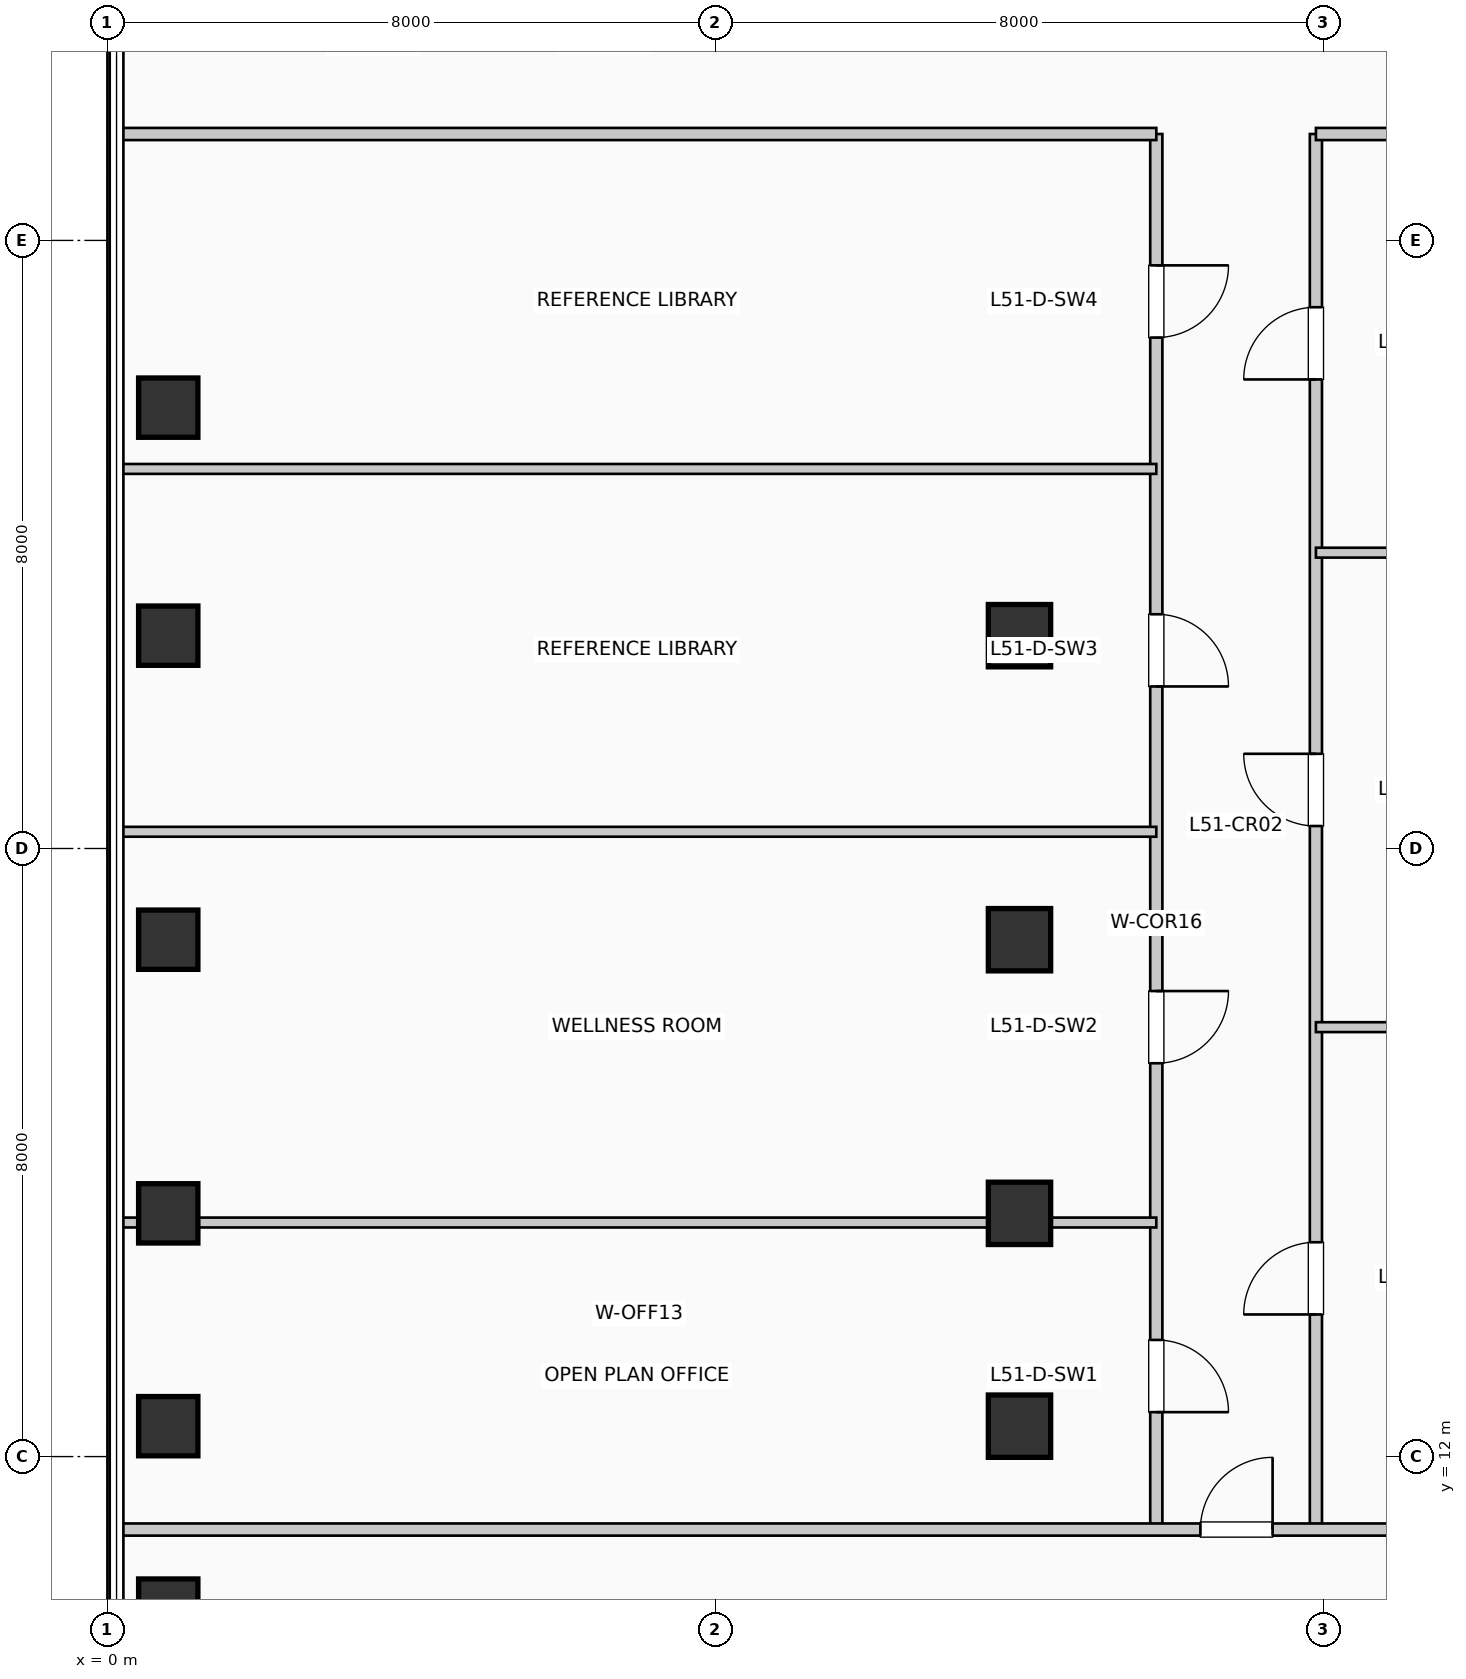
"""IFC4 building model, lengths in metres.
Left out: names, types, materials, properties, quantities, classifications, styles, units other than length and angle.
Written with IfcOpenShell. Run it as: python <this file> out.ifc"""

import sys

from ifc_helpers import new_model, si_unit, direction, frame, frame_2d, origin, origin_2d, place, context, subcontext, project, spatial, rectangle, extrude, element, fill, save


model = new_model("IFC4")
c1 = context("Model", 3, precision=1e-05, world=origin(), true_north=direction((0.0, 1.0)))
c2 = subcontext(c1, "Body", "Model", "MODEL_VIEW")
j1 = project(units=[si_unit("LENGTHUNIT", "METRE"), si_unit("PLANEANGLEUNIT", "RADIAN")], contexts=[c1])
p1 = place(None, origin())
s1 = spatial("IfcSite", under=j1, at=p1, CompositionType="ELEMENT")
p2 = place(p1, origin())
s2 = spatial("IfcBuilding", under=s1, at=p2, CompositionType="ELEMENT")
p3 = place(p2, frame((0.0, 0.0, 211.2)))
s3 = spatial("IfcBuildingStorey", under=s2, at=p3, CompositionType="ELEMENT", Elevation=211.2)
for number, where, z_axis, x_axis in (
    (1, (0.8, 10.0, 0.0), (0.0, 0.0, 1.0), (1.0, 0.0, 0.0)),
    (2, (0.8, 12.4, 0.0), (0.0, 0.0, 1.0), (1.0, 0.0, 0.0)),
    (3, (0.8, 15.2, 0.0), (0.0, 0.0, 1.0), (1.0, 0.0, 0.0)),
    (4, (0.8, 18.8, 0.0), (0.0, 0.0, 1.0), (1.0, 0.0, 0.0)),
    (5, (0.8, 22.8, 0.0), (0.0, 0.0, 1.0), (1.0, 0.0, 0.0)),
    (6, (0.8, 25.8, 0.0), (0.0, 0.0, 1.0), (1.0, 0.0, 0.0)),
):
    element("IfcColumn", number, at=place(p3, frame(where, z_axis=z_axis, x_axis=x_axis)), inside=s3, PredefinedType="COLUMN", context=c2, shape_type="SweptSolid", body=[
        extrude(rectangle(XDim=0.78, YDim=0.78, at=origin_2d()), origin(), (0.0, 0.0, 1.0), 3.96),
    ])
for number, where, z_axis, x_axis in (
    (7, (12.0, 12.4, 0.0), (0.0, 0.0, 1.0), (1.0, 0.0, 0.0)),
    (8, (12.0, 15.2, 0.0), (0.0, 0.0, 1.0), (1.0, 0.0, 0.0)),
    (9, (12.0, 18.8, 0.0), (0.0, 0.0, 1.0), (1.0, 0.0, 0.0)),
    (10, (12.0, 22.8, 0.0), (0.0, 0.0, 1.0), (1.0, 0.0, 0.0)),
):
    element("IfcColumn", number, at=place(p3, frame(where, z_axis=z_axis, x_axis=x_axis)), inside=s3, PredefinedType="COLUMN", context=c2, shape_type="SweptSolid", body=[
        extrude(rectangle(XDim=0.82, YDim=0.82, at=origin_2d()), origin(), (0.0, 0.0, 1.0), 3.96),
    ])
p4 = place(p3, frame((13.8, 11.04, 0.0), z_axis=(0.0, 0.0, 1.0), x_axis=(0.0, 1.0, 0.0)))
e11 = element("IfcWall", 11, at=p4, inside=s3, PredefinedType="PARTITIONING", context=c2, shape_type="SweptSolid", body=[
    extrude(rectangle(XDim=18.36, YDim=0.16, at=frame_2d((9.18, 0.0))), origin(), (0.0, 0.0, 1.0), 3.71),
])
p5 = place(p4, frame((2.495, 0.0, 0.0), z_axis=(0.0, 0.0, 1.0), x_axis=(-1.0, 0.0, 0.0)))
e12 = element("IfcOpeningElement", 12, at=p5, cuts=e11, PredefinedType="OPENING", context=c2, shape_type="SweptSolid", body=[
    extrude(rectangle(XDim=0.95, YDim=2.15, at=frame_2d((0.475, 1.075))), frame((0.0, 0.09, 0.0), z_axis=(0.0, -1.0, 0.0), x_axis=(1.0, 0.0, 0.0)), (0.0, 0.0, 1.0), 0.18),
])
p6 = place(p4, frame((7.084, 0.0, 0.0), z_axis=(0.0, 0.0, 1.0), x_axis=(-1.0, 0.0, 0.0)))
e13 = element("IfcOpeningElement", 13, at=p6, cuts=e11, PredefinedType="OPENING", context=c2, shape_type="SweptSolid", body=[
    extrude(rectangle(XDim=0.95, YDim=2.15, at=frame_2d((0.475, 1.075))), frame((0.0, 0.09, 0.0), z_axis=(0.0, -1.0, 0.0), x_axis=(1.0, 0.0, 0.0)), (0.0, 0.0, 1.0), 0.18),
])
p7 = place(p4, frame((12.042, 0.0, 0.0), z_axis=(0.0, 0.0, 1.0), x_axis=(-1.0, 0.0, 0.0)))
e14 = element("IfcOpeningElement", 14, at=p7, cuts=e11, PredefinedType="OPENING", context=c2, shape_type="SweptSolid", body=[
    extrude(rectangle(XDim=0.95, YDim=2.15, at=frame_2d((0.475, 1.075))), frame((0.0, 0.09, 0.0), z_axis=(0.0, -1.0, 0.0), x_axis=(1.0, 0.0, 0.0)), (0.0, 0.0, 1.0), 0.18),
])
p8 = place(p4, frame((16.632, 0.0, 0.0), z_axis=(0.0, 0.0, 1.0), x_axis=(-1.0, 0.0, 0.0)))
e15 = element("IfcOpeningElement", 15, at=p8, cuts=e11, PredefinedType="OPENING", context=c2, shape_type="SweptSolid", body=[
    extrude(rectangle(XDim=0.95, YDim=2.15, at=frame_2d((0.475, 1.075))), frame((0.0, 0.09, 0.0), z_axis=(0.0, -1.0, 0.0), x_axis=(1.0, 0.0, 0.0)), (0.0, 0.0, 1.0), 0.18),
])
p9 = place(p3, frame((15.9, 11.04, 0.0), z_axis=(0.0, 0.0, 1.0), x_axis=(0.0, 1.0, 0.0)))
e16 = element("IfcWall", 16, at=p9, inside=s3, PredefinedType="PARTITIONING", context=c2, shape_type="SweptSolid", body=[
    extrude(rectangle(XDim=18.36, YDim=0.16, at=frame_2d((9.18, 0.0))), origin(), (0.0, 0.0, 1.0), 3.71),
])
p10 = place(p9, frame((2.83, 0.0, 0.0)))
e17 = element("IfcOpeningElement", 17, at=p10, cuts=e16, PredefinedType="OPENING", context=c2, shape_type="SweptSolid", body=[
    extrude(rectangle(XDim=0.95, YDim=2.15, at=frame_2d((0.475, 1.075))), frame((0.0, 0.09, 0.0), z_axis=(0.0, -1.0, 0.0), x_axis=(1.0, 0.0, 0.0)), (0.0, 0.0, 1.0), 0.18),
])
p11 = place(p9, frame((9.256, 0.0, 0.0)))
e18 = element("IfcOpeningElement", 18, at=p11, cuts=e16, PredefinedType="OPENING", context=c2, shape_type="SweptSolid", body=[
    extrude(rectangle(XDim=0.95, YDim=2.15, at=frame_2d((0.475, 1.075))), frame((0.0, 0.09, 0.0), z_axis=(0.0, -1.0, 0.0), x_axis=(1.0, 0.0, 0.0)), (0.0, 0.0, 1.0), 0.18),
])
p12 = place(p9, frame((15.131, 0.0, 0.0)))
e19 = element("IfcOpeningElement", 19, at=p12, cuts=e16, PredefinedType="OPENING", context=c2, shape_type="SweptSolid", body=[
    extrude(rectangle(XDim=0.95, YDim=2.15, at=frame_2d((0.475, 1.075))), frame((0.0, 0.09, 0.0), z_axis=(0.0, -1.0, 0.0), x_axis=(1.0, 0.0, 0.0)), (0.0, 0.0, 1.0), 0.18),
])
p13 = place(p3, frame((0.19, 11.04, 0.0), z_axis=(0.0, 0.0, 1.0), x_axis=(1.0, 0.0, 0.0)))
e20 = element("IfcWall", 20, at=p13, inside=s3, PredefinedType="PARTITIONING", context=c2, shape_type="SweptSolid", body=[
    extrude(rectangle(XDim=23.26, YDim=0.16, at=frame_2d((11.63, 0.0))), origin(), (0.0, 0.0, 1.0), 3.71),
])
p14 = place(p13, frame((14.19, 0.0, 0.0)))
e21 = element("IfcOpeningElement", 21, at=p14, cuts=e20, PredefinedType="OPENING", context=c2, shape_type="SweptSolid", body=[
    extrude(rectangle(XDim=0.95, YDim=2.15, at=frame_2d((0.475, 1.075))), frame((0.0, 0.09, 0.0), z_axis=(0.0, -1.0, 0.0), x_axis=(1.0, 0.0, 0.0)), (0.0, 0.0, 1.0), 0.18),
])
p15 = place(p3, frame((0.19, 29.4, 0.0), z_axis=(0.0, 0.0, 1.0), x_axis=(1.0, 0.0, 0.0)))
e22 = element("IfcWall", 22, at=p15, inside=s3, PredefinedType="PARTITIONING", context=c2, shape_type="SweptSolid", body=[
    extrude(rectangle(XDim=13.61, YDim=0.16, at=frame_2d((6.805, 0.0))), origin(), (0.0, 0.0, 1.0), 3.365),
])
p16 = place(p3, frame((15.9, 29.4, 0.0), z_axis=(0.0, 0.0, 1.0), x_axis=(1.0, 0.0, 0.0)))
e23 = element("IfcWall", 23, at=p16, inside=s3, PredefinedType="PARTITIONING", context=c2, shape_type="SweptSolid", body=[
    extrude(rectangle(XDim=7.55, YDim=0.16, at=frame_2d((3.775, 0.0))), origin(), (0.0, 0.0, 1.0), 3.365),
])
p17 = place(p3, frame((0.19, 15.079, 0.0), z_axis=(0.0, 0.0, 1.0), x_axis=(1.0, 0.0, 0.0)))
e24 = element("IfcWall", 24, at=p17, inside=s3, PredefinedType="PARTITIONING", context=c2, shape_type="SweptSolid", body=[
    extrude(rectangle(XDim=13.61, YDim=0.13, at=frame_2d((6.805, 0.0))), origin(), (0.0, 0.0, 1.0), 3.095),
])
for number, where, z_axis, x_axis in (
    (25, (0.19, 20.22, 0.0), (0.0, 0.0, 1.0), (1.0, 0.0, 0.0)),
    (26, (0.19, 24.994, 0.0), (0.0, 0.0, 1.0), (1.0, 0.0, 0.0)),
):
    element("IfcWall", number, at=place(p3, frame(where, z_axis=z_axis, x_axis=x_axis)), inside=s3, PredefinedType="PARTITIONING", context=c2, shape_type="SweptSolid", body=[
        extrude(rectangle(XDim=13.61, YDim=0.13, at=frame_2d((6.805, 0.0))), origin(), (0.0, 0.0, 1.0), 3.71),
    ])
for number, where, z_axis, x_axis in (
    (27, (15.9, 17.65, 0.0), (0.0, 0.0, 1.0), (1.0, 0.0, 0.0)),
    (28, (15.9, 23.892, 0.0), (0.0, 0.0, 1.0), (1.0, 0.0, 0.0)),
):
    element("IfcWall", number, at=place(p3, frame(where, z_axis=z_axis, x_axis=x_axis)), inside=s3, PredefinedType="PARTITIONING", context=c2, shape_type="SweptSolid", body=[
        extrude(rectangle(XDim=7.55, YDim=0.13, at=frame_2d((3.775, 0.0))), origin(), (0.0, 0.0, 1.0), 3.71),
    ])
p18 = place(p14, origin())
e29 = element("IfcDoor", 29, at=p18, inside=s3, OperationType="SINGLE_SWING_RIGHT", PredefinedType="DOOR", context=c2, shape_type="SweptSolid", body=[
    extrude(rectangle(XDim=0.95, YDim=2.15, at=frame_2d((0.475, 1.075))), frame((0.0, 0.025, 0.0), z_axis=(0.0, -1.0, 0.0), x_axis=(1.0, 0.0, 0.0)), (0.0, 0.0, 1.0), 0.05),
])
fill(e21, e29)
p19 = place(p5, origin())
e30 = element("IfcDoor", 30, at=p19, inside=s3, OperationType="SINGLE_SWING_LEFT", PredefinedType="DOOR", context=c2, shape_type="SweptSolid", body=[
    extrude(rectangle(XDim=0.95, YDim=2.15, at=frame_2d((0.475, 1.075))), frame((0.0, 0.025, 0.0), z_axis=(0.0, -1.0, 0.0), x_axis=(1.0, 0.0, 0.0)), (0.0, 0.0, 1.0), 0.05),
])
fill(e12, e30)
p20 = place(p6, origin())
e31 = element("IfcDoor", 31, at=p20, inside=s3, OperationType="SINGLE_SWING_RIGHT", PredefinedType="DOOR", context=c2, shape_type="SweptSolid", body=[
    extrude(rectangle(XDim=0.95, YDim=2.15, at=frame_2d((0.475, 1.075))), frame((0.0, 0.025, 0.0), z_axis=(0.0, -1.0, 0.0), x_axis=(1.0, 0.0, 0.0)), (0.0, 0.0, 1.0), 0.05),
])
fill(e13, e31)
p21 = place(p7, origin())
e32 = element("IfcDoor", 32, at=p21, inside=s3, OperationType="SINGLE_SWING_LEFT", PredefinedType="DOOR", context=c2, shape_type="SweptSolid", body=[
    extrude(rectangle(XDim=0.95, YDim=2.15, at=frame_2d((0.475, 1.075))), frame((0.0, 0.025, 0.0), z_axis=(0.0, -1.0, 0.0), x_axis=(1.0, 0.0, 0.0)), (0.0, 0.0, 1.0), 0.05),
])
fill(e14, e32)
p22 = place(p8, origin())
e33 = element("IfcDoor", 33, at=p22, inside=s3, OperationType="SINGLE_SWING_RIGHT", PredefinedType="DOOR", context=c2, shape_type="SweptSolid", body=[
    extrude(rectangle(XDim=0.95, YDim=2.15, at=frame_2d((0.475, 1.075))), frame((0.0, 0.025, 0.0), z_axis=(0.0, -1.0, 0.0), x_axis=(1.0, 0.0, 0.0)), (0.0, 0.0, 1.0), 0.05),
])
fill(e15, e33)
p23 = place(p10, origin())
e34 = element("IfcDoor", 34, at=p23, inside=s3, OperationType="SINGLE_SWING_LEFT", PredefinedType="DOOR", context=c2, shape_type="SweptSolid", body=[
    extrude(rectangle(XDim=0.95, YDim=2.15, at=frame_2d((0.475, 1.075))), frame((0.0, 0.025, 0.0), z_axis=(0.0, -1.0, 0.0), x_axis=(1.0, 0.0, 0.0)), (0.0, 0.0, 1.0), 0.05),
])
fill(e17, e34)
p24 = place(p11, origin())
e35 = element("IfcDoor", 35, at=p24, inside=s3, OperationType="SINGLE_SWING_RIGHT", PredefinedType="DOOR", context=c2, shape_type="SweptSolid", body=[
    extrude(rectangle(XDim=0.95, YDim=2.15, at=frame_2d((0.475, 1.075))), frame((0.0, 0.025, 0.0), z_axis=(0.0, -1.0, 0.0), x_axis=(1.0, 0.0, 0.0)), (0.0, 0.0, 1.0), 0.05),
])
fill(e18, e35)
p25 = place(p12, origin())
e36 = element("IfcDoor", 36, at=p25, inside=s3, OperationType="SINGLE_SWING_LEFT", PredefinedType="DOOR", context=c2, shape_type="SweptSolid", body=[
    extrude(rectangle(XDim=0.95, YDim=2.15, at=frame_2d((0.475, 1.075))), frame((0.0, 0.025, 0.0), z_axis=(0.0, -1.0, 0.0), x_axis=(1.0, 0.0, 0.0)), (0.0, 0.0, 1.0), 0.05),
])
fill(e19, e36)
save(model, sys.argv[1])
